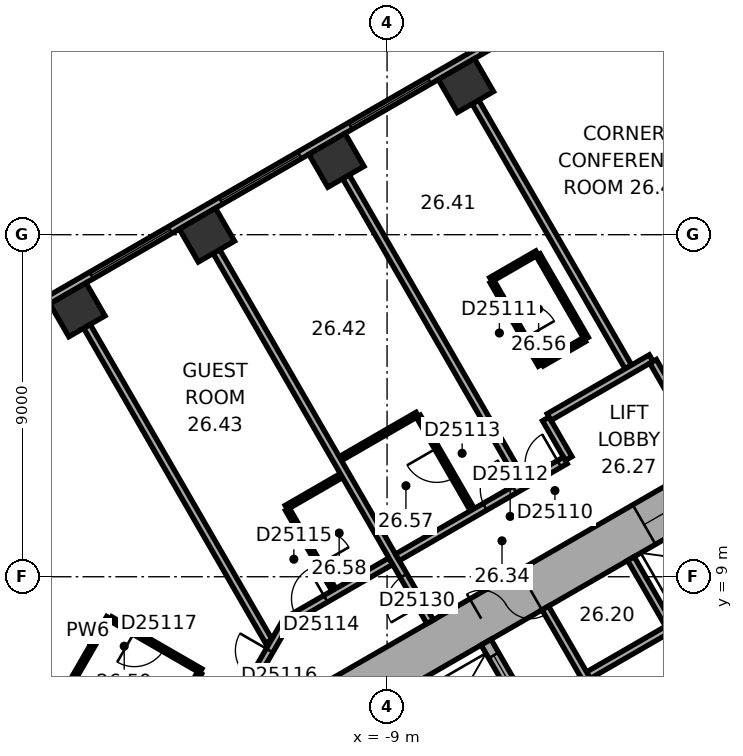
"""IFC4 building model, lengths in metres.
Left out: names, types, materials, properties, quantities, classifications, styles, units other than length and angle.
Written with IfcOpenShell. Run it as: python <this file> out.ifc"""

import sys

from ifc_helpers import new_model, si_unit, direction, frame, frame_2d, origin, origin_2d, place, context, subcontext, project, spatial, rectangle, extrude, element, fill, save


model = new_model("IFC4")
c1 = context("Model", 3, precision=1e-05, world=origin(), true_north=direction((0.0, 1.0)))
c2 = subcontext(c1, "Body", "Model", "MODEL_VIEW")
j1 = project(units=[si_unit("LENGTHUNIT", "METRE"), si_unit("PLANEANGLEUNIT", "RADIAN")], contexts=[c1])
p1 = place(None, origin())
s1 = spatial("IfcSite", under=j1, at=p1, CompositionType="ELEMENT")
p2 = place(p1, origin())
s2 = spatial("IfcBuilding", under=s1, at=p2, CompositionType="ELEMENT")
p3 = place(p2, frame((0.0, 0.0, 110.0)))
s3 = spatial("IfcBuildingStorey", under=s2, at=p3, CompositionType="ELEMENT", Elevation=110.0)
for number, where, z_axis, x_axis in (
    (1, (-6.926, 21.925, 0.0), (0.0, 0.0, 1.0), (-0.866, -0.5, 0.0)),
    (2, (-10.333, 19.957, 0.0), (0.0, 0.0, 1.0), (-0.866, -0.5, 0.0)),
    (3, (-13.74, 17.99, 0.0), (0.0, 0.0, 1.0), (-0.866, -0.5, 0.0)),
    (4, (-17.148, 16.023, 0.0), (0.0, 0.0, 1.0), (-0.866, -0.5, 0.0)),
):
    element("IfcColumn", number, at=place(p3, frame(where, z_axis=z_axis, x_axis=x_axis)), inside=s3, PredefinedType="COLUMN", context=c2, shape_type="SweptSolid", body=[
        extrude(rectangle(XDim=1.1, YDim=1.0, at=origin_2d()), origin(), (0.0, 0.0, 1.0), 3.3),
    ])
p4 = place(p3, frame((0.3, 11.836, 0.0), z_axis=(0.0, 0.0, 1.0), x_axis=(-0.866021384402, -0.500006961711, 0.0)))
e5 = element("IfcWall", 5, at=p4, inside=s3, PredefinedType="SHEAR", context=c2, shape_type="SweptSolid", body=[
    extrude(rectangle(XDim=12.355, YDim=1.2, at=frame_2d((6.178, 0.0))), origin(), (0.0, 0.0, 1.0), 3.3),
])
p5 = place(p4, frame((6.378, 0.0, 0.0)))
e6 = element("IfcOpeningElement", 6, at=p5, cuts=e5, PredefinedType="OPENING", context=c2, shape_type="SweptSolid", body=[
    extrude(rectangle(XDim=1.5, YDim=2.1, at=frame_2d((0.75, 1.05))), frame((0.0, 0.61, 0.0), z_axis=(0.0, -1.0, 0.0), x_axis=(1.0, 0.0, 0.0)), (0.0, 0.0, 1.0), 1.22),
])
p6 = place(p4, frame((1.828, 0.0, 0.0)))
e7 = element("IfcOpeningElement", 7, at=p6, cuts=e5, PredefinedType="OPENING", context=c2, shape_type="SweptSolid", body=[
    extrude(rectangle(XDim=1.1, YDim=2.1, at=frame_2d((0.55, 1.05))), frame((0.0, 0.61, 0.0), z_axis=(0.0, -1.0, 0.0), x_axis=(1.0, 0.0, 0.0)), (0.0, 0.0, 1.0), 1.22),
])
p7 = place(p3, frame((-3.136, 24.805, 0.0), z_axis=(0.0, 0.0, 1.0), x_axis=(-0.866028291626, -0.499994998079, 0.0)))
e8 = element("IfcWall", 8, at=p7, inside=s3, PredefinedType="STANDARD", context=c2, shape_type="SweptSolid", body=[
    extrude(rectangle(XDim=21.246, YDim=0.2, at=frame_2d((10.623, 0.0))), origin(), (0.0, 0.0, 1.0), 3.3),
])
p8 = place(p7, frame((1.555, 0.0, 0.8)))
e9 = element("IfcOpeningElement", 9, at=p8, cuts=e8, PredefinedType="OPENING", context=c2, shape_type="SweptSolid", body=[
    extrude(rectangle(XDim=2.4, YDim=1.7, at=frame_2d((1.2, 0.85))), frame((0.0, 0.11, 0.0), z_axis=(0.0, -1.0, 0.0), x_axis=(1.0, 0.0, 0.0)), (0.0, 0.0, 1.0), 0.22),
])
p9 = place(p7, frame((5.489, 0.0, 0.8)))
e10 = element("IfcOpeningElement", 10, at=p9, cuts=e8, PredefinedType="OPENING", context=c2, shape_type="SweptSolid", body=[
    extrude(rectangle(XDim=2.4, YDim=1.7, at=frame_2d((1.2, 0.85))), frame((0.0, 0.11, 0.0), z_axis=(0.0, -1.0, 0.0), x_axis=(1.0, 0.0, 0.0)), (0.0, 0.0, 1.0), 0.22),
])
p10 = place(p7, frame((9.424, 0.0, 0.8)))
e11 = element("IfcOpeningElement", 11, at=p10, cuts=e8, PredefinedType="OPENING", context=c2, shape_type="SweptSolid", body=[
    extrude(rectangle(XDim=2.4, YDim=1.7, at=frame_2d((1.2, 0.85))), frame((0.0, 0.11, 0.0), z_axis=(0.0, -1.0, 0.0), x_axis=(1.0, 0.0, 0.0)), (0.0, 0.0, 1.0), 0.22),
])
p11 = place(p7, frame((13.358, 0.0, 0.8)))
e12 = element("IfcOpeningElement", 12, at=p11, cuts=e8, PredefinedType="OPENING", context=c2, shape_type="SweptSolid", body=[
    extrude(rectangle(XDim=2.4, YDim=1.7, at=frame_2d((1.2, 0.85))), frame((0.0, 0.11, 0.0), z_axis=(0.0, -1.0, 0.0), x_axis=(1.0, 0.0, 0.0)), (0.0, 0.0, 1.0), 0.22),
])
p12 = place(p7, frame((17.293, 0.0, 0.8)))
e13 = element("IfcOpeningElement", 13, at=p12, cuts=e8, PredefinedType="OPENING", context=c2, shape_type="SweptSolid", body=[
    extrude(rectangle(XDim=2.4, YDim=1.7, at=frame_2d((1.2, 0.85))), frame((0.0, 0.11, 0.0), z_axis=(0.0, -1.0, 0.0), x_axis=(1.0, 0.0, 0.0)), (0.0, 0.0, 1.0), 0.22),
])
p13 = place(p3, frame((0.803, 9.009, 0.0), z_axis=(0.0, 0.0, 1.0), x_axis=(-0.866028230842, -0.499995103361, 0.0)))
e14 = element("IfcWall", 14, at=p13, inside=s3, PredefinedType="PARTITIONING", context=c2, shape_type="SweptSolid", body=[
    extrude(rectangle(XDim=5.4, YDim=0.2, at=frame_2d((2.7, 0.0))), origin(), (0.0, 0.0, 1.0), 3.05),
])
for number, where, z_axis, x_axis in (
    (15, (-1.485, 7.572, 0.0), (0.0, 0.0, 1.0), (-0.5, 0.866, 0.0)),
    (16, (-3.737, 6.272, 0.0), (0.0, 0.0, 1.0), (-0.5, 0.866, 0.0)),
):
    element("IfcWall", number, at=place(p3, frame(where, z_axis=z_axis, x_axis=x_axis)), inside=s3, PredefinedType="PARTITIONING", context=c2, shape_type="SweptSolid", body=[
        extrude(rectangle(XDim=2.2, YDim=0.2, at=frame_2d((1.1, 0.0))), origin(), (0.0, 0.0, 1.0), 3.05),
    ])
p14 = place(p3, frame((-2.216, 4.282, 0.0), z_axis=(0.0, 0.0, 1.0), x_axis=(0.499977259774, 0.866038532462, 0.0)))
e17 = element("IfcWall", 17, at=p14, inside=s3, PredefinedType="SHEAR", context=c2, shape_type="SweptSolid", body=[
    extrude(rectangle(XDim=4.7, YDim=0.3, at=frame_2d((2.35, 0.0))), origin(), (0.0, 0.0, 1.0), 3.05),
])
p15 = place(p3, frame((-5.295, 5.372, 0.0), z_axis=(0.0, 0.0, 1.0), x_axis=(-0.500077893725, 0.86598042715, 0.0)))
e18 = element("IfcWall", 18, at=p15, inside=s3, PredefinedType="SHEAR", context=c2, shape_type="SweptSolid", body=[
    extrude(rectangle(XDim=2.2, YDim=0.3, at=frame_2d((1.1, 0.0))), origin(), (0.0, 0.0, 1.0), 3.05),
])
p16 = place(p15, frame((0.7, 0.0, 0.0)))
e19 = element("IfcOpeningElement", 19, at=p16, cuts=e18, PredefinedType="OPENING", context=c2, shape_type="SweptSolid", body=[
    extrude(rectangle(XDim=1.1, YDim=2.1, at=frame_2d((0.55, 1.05))), frame((0.0, 0.16, 0.0), z_axis=(0.0, -1.0, 0.0), x_axis=(1.0, 0.0, 0.0)), (0.0, 0.0, 1.0), 0.32),
])
p17 = place(p3, frame((-17.426, 6.019, 0.0), z_axis=(0.0, 0.0, 1.0), x_axis=(0.50002983664, 0.866008176907, 0.0)))
e20 = element("IfcWall", 20, at=p17, inside=s3, PredefinedType="PARTITIONING", context=c2, shape_type="SweptSolid", body=[
    extrude(rectangle(XDim=2.2, YDim=0.12, at=frame_2d((1.1, 0.0))), origin(), (0.0, 0.0, 1.0), 3.05),
])
p18 = place(p3, frame((-16.898, 15.59, 0.0), z_axis=(0.0, 0.0, 1.0), x_axis=(0.500023458698, -0.866011859475, 0.0)))
e21 = element("IfcWall", 21, at=p18, inside=s3, PredefinedType="PARTITIONING", context=c2, shape_type="SweptSolid", body=[
    extrude(rectangle(XDim=9.572, YDim=0.2, at=frame_2d((4.786, 0.0))), origin(), (0.0, 0.0, 1.0), 3.05),
])
p19 = place(p3, frame((-16.274, 7.895, 0.0), z_axis=(0.0, 0.0, 1.0), x_axis=(0.865997131366, -0.500048966069, 0.0)))
e22 = element("IfcWall", 22, at=p19, inside=s3, PredefinedType="PARTITIONING", context=c2, shape_type="SweptSolid", body=[
    extrude(rectangle(XDim=2.74, YDim=0.12, at=frame_2d((1.37, 0.0))), origin(), (0.0, 0.0, 1.0), 3.05),
])
p20 = place(p19, frame((0.72, 0.0, 0.0)))
e23 = element("IfcOpeningElement", 23, at=p20, cuts=e22, PredefinedType="OPENING", context=c2, shape_type="SweptSolid", body=[
    extrude(rectangle(XDim=0.9, YDim=2.1, at=frame_2d((0.45, 1.05))), frame((0.0, 0.07, 0.0), z_axis=(0.0, -1.0, 0.0), x_axis=(1.0, 0.0, 0.0)), (0.0, 0.0, 1.0), 0.14),
])
p21 = place(p3, frame((-13.931, 6.472, 0.0), z_axis=(0.0, 0.0, 1.0), x_axis=(-0.499739399214, -0.866175809448, 0.0)))
e24 = element("IfcWall", 24, at=p21, inside=s3, PredefinedType="PARTITIONING", context=c2, shape_type="SweptSolid", body=[
    extrude(rectangle(XDim=0.416, YDim=0.12, at=frame_2d((0.208, 0.0))), origin(), (0.0, 0.0, 1.0), 3.05),
])
p22 = place(p3, frame((-11.65, 7.823, 0.0), z_axis=(0.0, 0.0, 1.0), x_axis=(-0.500063520245, -0.865988727248, 0.0)))
e25 = element("IfcWall", 25, at=p22, inside=s3, PredefinedType="PARTITIONING", context=c2, shape_type="SweptSolid", body=[
    extrude(rectangle(XDim=1.9, YDim=0.2, at=frame_2d((0.95, 0.0))), origin(), (0.0, 0.0, 1.0), 3.05),
])
p23 = place(p22, frame((0.882, 0.0, 0.0)))
e26 = element("IfcOpeningElement", 26, at=p23, cuts=e25, PredefinedType="OPENING", context=c2, shape_type="SweptSolid", body=[
    extrude(rectangle(XDim=0.9, YDim=2.1, at=frame_2d((0.45, 1.05))), frame((0.0, 0.11, 0.0), z_axis=(0.0, -1.0, 0.0), x_axis=(1.0, 0.0, 0.0)), (0.0, 0.0, 1.0), 0.22),
])
p24 = place(p3, frame((-11.651, 10.825, 0.0), z_axis=(0.0, 0.0, 1.0), x_axis=(0.865998477143, 0.500046635412, 0.0)))
e27 = element("IfcWall", 27, at=p24, inside=s3, PredefinedType="PARTITIONING", context=c2, shape_type="SweptSolid", body=[
    extrude(rectangle(XDim=1.673, YDim=0.12, at=frame_2d((0.836, 0.0))), origin(), (0.0, 0.0, 1.0), 3.05),
])
p25 = place(p3, frame((-10.401, 8.66, 0.0), z_axis=(0.0, 0.0, 1.0), x_axis=(-0.500077547548, 0.865980627057, 0.0)))
e28 = element("IfcWall", 28, at=p25, inside=s3, PredefinedType="PARTITIONING", context=c2, shape_type="SweptSolid", body=[
    extrude(rectangle(XDim=2.44, YDim=0.12, at=frame_2d((1.22, 0.0))), origin(), (0.0, 0.0, 1.0), 3.05),
])
p26 = place(p25, frame((0.77, 0.0, 0.0)))
e29 = element("IfcOpeningElement", 29, at=p26, cuts=e28, PredefinedType="OPENING", context=c2, shape_type="SweptSolid", body=[
    extrude(rectangle(XDim=0.9, YDim=2.1, at=frame_2d((0.45, 1.05))), frame((0.0, 0.07, 0.0), z_axis=(0.0, -1.0, 0.0), x_axis=(1.0, 0.0, 0.0)), (0.0, 0.0, 1.0), 0.14),
])
p27 = place(p3, frame((-10.229, 12.108, 0.0), z_axis=(0.0, 0.0, 1.0), x_axis=(0.866053246676, 0.499951771596, 0.0)))
e30 = element("IfcWall", 30, at=p27, inside=s3, PredefinedType="PARTITIONING", context=c2, shape_type="SweptSolid", body=[
    extrude(rectangle(XDim=2.335, YDim=0.12, at=frame_2d((1.167, 0.0))), origin(), (0.0, 0.0, 1.0), 3.05),
])
p28 = place(p3, frame((-10.083, 19.524, 0.0), z_axis=(0.0, 0.0, 1.0), x_axis=(0.499999662836, -0.866025598446, 0.0)))
e31 = element("IfcWall", 31, at=p28, inside=s3, PredefinedType="PARTITIONING", context=c2, shape_type="SweptSolid", body=[
    extrude(rectangle(XDim=9.25, YDim=0.2, at=frame_2d((4.625, 0.0))), origin(), (0.0, 0.0, 1.0), 2.6),
])
p29 = place(p3, frame((-8.902, 9.41, 0.0), z_axis=(0.0, 0.0, 1.0), x_axis=(-0.866014299198, -0.500019233215, 0.0)))
e32 = element("IfcWall", 32, at=p29, inside=s3, PredefinedType="PARTITIONING", context=c2, shape_type="SweptSolid", body=[
    extrude(rectangle(XDim=3.133, YDim=0.2, at=frame_2d((1.567, 0.0))), origin(), (0.0, 0.0, 1.0), 3.05),
])
p30 = place(p29, frame((1.978, 0.0, 0.0)))
e33 = element("IfcOpeningElement", 33, at=p30, cuts=e32, PredefinedType="OPENING", context=c2, shape_type="SweptSolid", body=[
    extrude(rectangle(XDim=0.9, YDim=2.1, at=frame_2d((0.45, 1.05))), frame((0.0, 0.11, 0.0), z_axis=(0.0, -1.0, 0.0), x_axis=(1.0, 0.0, 0.0)), (0.0, 0.0, 1.0), 0.22),
])
p31 = place(p3, frame((-8.177, 13.223, 0.0), z_axis=(0.0, 0.0, 1.0), x_axis=(0.500087089641, -0.865975116718, 0.0)))
e34 = element("IfcWall", 34, at=p31, inside=s3, PredefinedType="PARTITIONING", context=c2, shape_type="SweptSolid", body=[
    extrude(rectangle(XDim=2.84, YDim=0.12, at=frame_2d((1.42, 0.0))), origin(), (0.0, 0.0, 1.0), 3.05),
])
p32 = place(p31, frame((0.97, 0.0, 0.0)))
e35 = element("IfcOpeningElement", 35, at=p32, cuts=e34, PredefinedType="OPENING", context=c2, shape_type="SweptSolid", body=[
    extrude(rectangle(XDim=0.9, YDim=2.1, at=frame_2d((0.45, 1.05))), frame((0.0, 0.07, 0.0), z_axis=(0.0, -1.0, 0.0), x_axis=(1.0, 0.0, 0.0)), (0.0, 0.0, 1.0), 0.14),
])
p33 = place(p3, frame((-7.865, 7.814, 0.0), z_axis=(0.0, 0.0, 1.0), x_axis=(-0.500004234368, 0.866022959057, 0.0)))
e36 = element("IfcWall", 36, at=p33, inside=s3, PredefinedType="PARTITIONING", context=c2, shape_type="SweptSolid", body=[
    extrude(rectangle(XDim=11.25, YDim=0.2, at=frame_2d((5.625, 0.0))), origin(), (0.0, 0.0, 1.0), 3.05),
])
p34 = place(p33, frame((0.5, 0.0, 0.0)))
e37 = element("IfcOpeningElement", 37, at=p34, cuts=e36, PredefinedType="OPENING", context=c2, shape_type="SweptSolid", body=[
    extrude(rectangle(XDim=0.9, YDim=2.1, at=frame_2d((0.45, 1.05))), frame((0.0, 0.11, 0.0), z_axis=(0.0, -1.0, 0.0), x_axis=(1.0, 0.0, 0.0)), (0.0, 0.0, 1.0), 0.22),
])
p35 = place(p3, frame((-6.676, 21.492, 0.0), z_axis=(0.0, 0.0, 1.0), x_axis=(0.500011263043, -0.866018900966, 0.0)))
e38 = element("IfcWall", 38, at=p35, inside=s3, PredefinedType="PARTITIONING", context=c2, shape_type="SweptSolid", body=[
    extrude(rectangle(XDim=8.049, YDim=0.2, at=frame_2d((4.024, 0.0))), origin(), (0.0, 0.0, 1.0), 3.05),
])
p36 = place(p3, frame((-6.268, 16.82, 0.0), z_axis=(0.0, 0.0, 1.0), x_axis=(0.866002662425, 0.500039387122, 0.0)))
e39 = element("IfcWall", 39, at=p36, inside=s3, PredefinedType="PARTITIONING", context=c2, shape_type="SweptSolid", body=[
    extrude(rectangle(XDim=1.4, YDim=0.12, at=frame_2d((0.7, 0.0))), origin(), (0.0, 0.0, 1.0), 3.05),
])
p37 = place(p3, frame((-5.026, 17.469, 0.0), z_axis=(0.0, 0.0, 1.0), x_axis=(0.500005339912, -0.866022320763, 0.0)))
e40 = element("IfcWall", 40, at=p37, inside=s3, PredefinedType="PARTITIONING", context=c2, shape_type="SweptSolid", body=[
    extrude(rectangle(XDim=2.54, YDim=0.12, at=frame_2d((1.27, 0.0))), origin(), (0.0, 0.0, 1.0), 3.05),
])
p38 = place(p3, frame((-4.968, 14.569, 0.0), z_axis=(0.0, 0.0, 1.0), x_axis=(-0.500046963369, 0.865998287773, 0.0)))
e41 = element("IfcWall", 41, at=p38, inside=s3, PredefinedType="PARTITIONING", context=c2, shape_type="SweptSolid", body=[
    extrude(rectangle(XDim=2.54, YDim=0.12, at=frame_2d((1.27, 0.0))), origin(), (0.0, 0.0, 1.0), 3.05),
])
p39 = place(p38, frame((0.82, 0.0, 0.0)))
e42 = element("IfcOpeningElement", 42, at=p39, cuts=e41, PredefinedType="OPENING", context=c2, shape_type="SweptSolid", body=[
    extrude(rectangle(XDim=0.9, YDim=2.1, at=frame_2d((0.45, 1.05))), frame((0.0, 0.07, 0.0), z_axis=(0.0, -1.0, 0.0), x_axis=(1.0, 0.0, 0.0)), (0.0, 0.0, 1.0), 0.14),
])
p40 = place(p3, frame((-4.823, 13.152, 0.0), z_axis=(0.0, 0.0, 1.0), x_axis=(0.499986357472, -0.866033280158, 0.0)))
e43 = element("IfcWall", 43, at=p40, inside=s3, PredefinedType="PARTITIONING", context=c2, shape_type="SweptSolid", body=[
    extrude(rectangle(XDim=1.201, YDim=0.2, at=frame_2d((0.601, 0.0))), origin(), (0.0, 0.0, 1.0), 3.05),
])
p41 = place(p3, frame((-4.309, 12.061, 0.0), z_axis=(0.0, 0.0, 1.0), x_axis=(-0.866020679205, -0.500008183122, 0.0)))
e44 = element("IfcWall", 44, at=p41, inside=s3, PredefinedType="PARTITIONING", context=c2, shape_type="SweptSolid", body=[
    extrude(rectangle(XDim=5.104, YDim=0.2, at=frame_2d((2.552, 0.0))), origin(), (0.0, 0.0, 1.0), 3.05),
])
p42 = place(p41, frame((0.185, 0.0, 0.0)))
e45 = element("IfcOpeningElement", 45, at=p42, cuts=e44, PredefinedType="OPENING", context=c2, shape_type="SweptSolid", body=[
    extrude(rectangle(XDim=0.9, YDim=2.1, at=frame_2d((0.45, 1.05))), frame((0.0, 0.11, 0.0), z_axis=(0.0, -1.0, 0.0), x_axis=(1.0, 0.0, 0.0)), (0.0, 0.0, 1.0), 0.22),
])
p43 = place(p41, frame((1.544, 0.0, 0.0)))
e46 = element("IfcOpeningElement", 46, at=p43, cuts=e44, PredefinedType="OPENING", context=c2, shape_type="SweptSolid", body=[
    extrude(rectangle(XDim=0.9, YDim=2.1, at=frame_2d((0.45, 1.05))), frame((0.0, 0.11, 0.0), z_axis=(0.0, -1.0, 0.0), x_axis=(1.0, 0.0, 0.0)), (0.0, 0.0, 1.0), 0.22),
])
p44 = place(p3, frame((-3.808, 15.239, 0.0), z_axis=(0.0, 0.0, 1.0), x_axis=(-0.866087136806, -0.499893060024, 0.0)))
e47 = element("IfcWall", 47, at=p44, inside=s3, PredefinedType="PARTITIONING", context=c2, shape_type="SweptSolid", body=[
    extrude(rectangle(XDim=1.28, YDim=0.12, at=frame_2d((0.64, 0.0))), origin(), (0.0, 0.0, 1.0), 3.05),
])
p45 = place(p3, frame((-2.05, 14.752, 0.0), z_axis=(0.0, 0.0, 1.0), x_axis=(-0.866030936828, -0.499990416364, 0.0)))
e48 = element("IfcWall", 48, at=p45, inside=s3, PredefinedType="PARTITIONING", context=c2, shape_type="SweptSolid", body=[
    extrude(rectangle(XDim=3.102, YDim=0.2, at=frame_2d((1.551, 0.0))), origin(), (0.0, 0.0, 1.0), 3.05),
])
p46 = place(p3, frame((-1.449, 13.712, 0.0), z_axis=(0.0, 0.0, 1.0), x_axis=(-0.499978356969, 0.866037899034, 0.0)))
e49 = element("IfcWall", 49, at=p46, inside=s3, PredefinedType="PARTITIONING", context=c2, shape_type="SweptSolid", body=[
    extrude(rectangle(XDim=1.101, YDim=0.2, at=frame_2d((0.551, 0.0))), origin(), (0.0, 0.0, 1.0), 3.05),
])
p47 = place(p9, origin())
e50 = element("IfcWindow", 50, at=p47, inside=s3, PartitioningType="SINGLE_PANEL", PredefinedType="WINDOW", context=c2, shape_type="SweptSolid", body=[
    extrude(rectangle(XDim=2.4, YDim=1.7, at=frame_2d((1.2, 0.85))), frame((0.0, 0.03, 0.0), z_axis=(0.0, -1.0, 0.0), x_axis=(1.0, 0.0, 0.0)), (0.0, 0.0, 1.0), 0.06),
])
fill(e10, e50)
p48 = place(p10, origin())
e51 = element("IfcWindow", 51, at=p48, inside=s3, PartitioningType="SINGLE_PANEL", PredefinedType="WINDOW", context=c2, shape_type="SweptSolid", body=[
    extrude(rectangle(XDim=2.4, YDim=1.7, at=frame_2d((1.2, 0.85))), frame((0.0, 0.03, 0.0), z_axis=(0.0, -1.0, 0.0), x_axis=(1.0, 0.0, 0.0)), (0.0, 0.0, 1.0), 0.06),
])
fill(e11, e51)
p49 = place(p11, origin())
e52 = element("IfcWindow", 52, at=p49, inside=s3, PartitioningType="SINGLE_PANEL", PredefinedType="WINDOW", context=c2, shape_type="SweptSolid", body=[
    extrude(rectangle(XDim=2.4, YDim=1.7, at=frame_2d((1.2, 0.85))), frame((0.0, 0.03, 0.0), z_axis=(0.0, -1.0, 0.0), x_axis=(1.0, 0.0, 0.0)), (0.0, 0.0, 1.0), 0.06),
])
fill(e12, e52)
p50 = place(p5, origin())
e53 = element("IfcDoor", 53, at=p50, inside=s3, OperationType="DOUBLE_DOOR_SINGLE_SWING", PredefinedType="DOOR", context=c2, shape_type="SweptSolid", body=[
    extrude(rectangle(XDim=1.5, YDim=2.1, at=frame_2d((0.75, 1.05))), frame((0.0, 0.025, 0.0), z_axis=(0.0, -1.0, 0.0), x_axis=(1.0, 0.0, 0.0)), (0.0, 0.0, 1.0), 0.05),
])
fill(e6, e53)
p51 = place(p16, origin())
e54 = element("IfcDoor", 54, at=p51, inside=s3, OperationType="DOUBLE_DOOR_SLIDING", PredefinedType="DOOR", context=c2, shape_type="SweptSolid", body=[
    extrude(rectangle(XDim=1.1, YDim=2.1, at=frame_2d((0.55, 1.05))), frame((0.0, 0.025, 0.0), z_axis=(0.0, -1.0, 0.0), x_axis=(1.0, 0.0, 0.0)), (0.0, 0.0, 1.0), 0.05),
])
fill(e19, e54)
p52 = place(p6, origin())
e55 = element("IfcDoor", 55, at=p52, inside=s3, OperationType="DOUBLE_DOOR_SLIDING", PredefinedType="DOOR", context=c2, shape_type="SweptSolid", body=[
    extrude(rectangle(XDim=1.1, YDim=2.1, at=frame_2d((0.55, 1.05))), frame((0.0, 0.025, 0.0), z_axis=(0.0, -1.0, 0.0), x_axis=(1.0, 0.0, 0.0)), (0.0, 0.0, 1.0), 0.05),
])
fill(e7, e55)
p53 = place(p42, origin())
e56 = element("IfcDoor", 56, at=p53, inside=s3, OperationType="SINGLE_SWING_LEFT", PredefinedType="DOOR", context=c2, shape_type="SweptSolid", body=[
    extrude(rectangle(XDim=0.9, YDim=2.1, at=frame_2d((0.45, 1.05))), frame((0.0, 0.025, 0.0), z_axis=(0.0, -1.0, 0.0), x_axis=(1.0, 0.0, 0.0)), (0.0, 0.0, 1.0), 0.05),
])
fill(e45, e56)
p54 = place(p39, origin())
e57 = element("IfcDoor", 57, at=p54, inside=s3, OperationType="SINGLE_SWING_LEFT", PredefinedType="DOOR", context=c2, shape_type="SweptSolid", body=[
    extrude(rectangle(XDim=0.9, YDim=2.1, at=frame_2d((0.45, 1.05))), frame((0.0, 0.025, 0.0), z_axis=(0.0, -1.0, 0.0), x_axis=(1.0, 0.0, 0.0)), (0.0, 0.0, 1.0), 0.05),
])
fill(e42, e57)
p55 = place(p43, origin())
e58 = element("IfcDoor", 58, at=p55, inside=s3, OperationType="SINGLE_SWING_LEFT", PredefinedType="DOOR", context=c2, shape_type="SweptSolid", body=[
    extrude(rectangle(XDim=0.9, YDim=2.1, at=frame_2d((0.45, 1.05))), frame((0.0, 0.025, 0.0), z_axis=(0.0, -1.0, 0.0), x_axis=(1.0, 0.0, 0.0)), (0.0, 0.0, 1.0), 0.05),
])
fill(e46, e58)
p56 = place(p32, origin())
e59 = element("IfcDoor", 59, at=p56, inside=s3, OperationType="SINGLE_SWING_LEFT", PredefinedType="DOOR", context=c2, shape_type="SweptSolid", body=[
    extrude(rectangle(XDim=0.9, YDim=2.1, at=frame_2d((0.45, 1.05))), frame((0.0, 0.025, 0.0), z_axis=(0.0, -1.0, 0.0), x_axis=(1.0, 0.0, 0.0)), (0.0, 0.0, 1.0), 0.05),
])
fill(e35, e59)
p57 = place(p30, origin())
e60 = element("IfcDoor", 60, at=p57, inside=s3, OperationType="SINGLE_SWING_LEFT", PredefinedType="DOOR", context=c2, shape_type="SweptSolid", body=[
    extrude(rectangle(XDim=0.9, YDim=2.1, at=frame_2d((0.45, 1.05))), frame((0.0, 0.025, 0.0), z_axis=(0.0, -1.0, 0.0), x_axis=(1.0, 0.0, 0.0)), (0.0, 0.0, 1.0), 0.05),
])
fill(e33, e60)
p58 = place(p26, origin())
e61 = element("IfcDoor", 61, at=p58, inside=s3, OperationType="SINGLE_SWING_LEFT", PredefinedType="DOOR", context=c2, shape_type="SweptSolid", body=[
    extrude(rectangle(XDim=0.9, YDim=2.1, at=frame_2d((0.45, 1.05))), frame((0.0, 0.025, 0.0), z_axis=(0.0, -1.0, 0.0), x_axis=(1.0, 0.0, 0.0)), (0.0, 0.0, 1.0), 0.05),
])
fill(e29, e61)
p59 = place(p23, origin())
e62 = element("IfcDoor", 62, at=p59, inside=s3, OperationType="SINGLE_SWING_LEFT", PredefinedType="DOOR", context=c2, shape_type="SweptSolid", body=[
    extrude(rectangle(XDim=0.9, YDim=2.1, at=frame_2d((0.45, 1.05))), frame((0.0, 0.025, 0.0), z_axis=(0.0, -1.0, 0.0), x_axis=(1.0, 0.0, 0.0)), (0.0, 0.0, 1.0), 0.05),
])
fill(e26, e62)
p60 = place(p20, origin())
e63 = element("IfcDoor", 63, at=p60, inside=s3, OperationType="SINGLE_SWING_LEFT", PredefinedType="DOOR", context=c2, shape_type="SweptSolid", body=[
    extrude(rectangle(XDim=0.9, YDim=2.1, at=frame_2d((0.45, 1.05))), frame((0.0, 0.025, 0.0), z_axis=(0.0, -1.0, 0.0), x_axis=(1.0, 0.0, 0.0)), (0.0, 0.0, 1.0), 0.05),
])
fill(e23, e63)
p61 = place(p34, origin())
e64 = element("IfcDoor", 64, at=p61, inside=s3, OperationType="SINGLE_SWING_LEFT", PredefinedType="DOOR", context=c2, shape_type="SweptSolid", body=[
    extrude(rectangle(XDim=0.9, YDim=2.1, at=frame_2d((0.45, 1.05))), frame((0.0, 0.025, 0.0), z_axis=(0.0, -1.0, 0.0), x_axis=(1.0, 0.0, 0.0)), (0.0, 0.0, 1.0), 0.05),
])
fill(e37, e64)
save(model, sys.argv[1])
